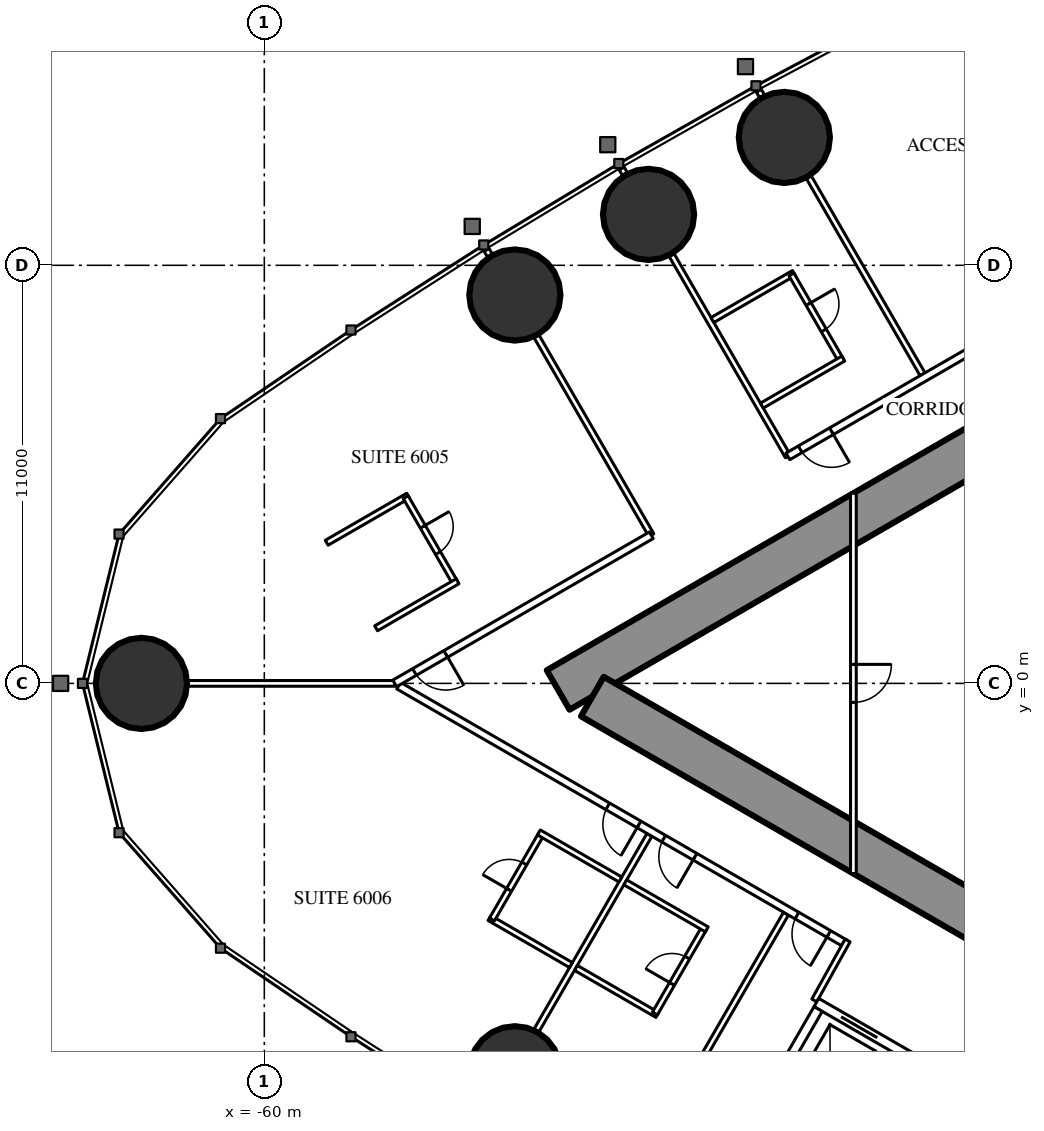
"""IFC4 building model, lengths in metres.
Left out: names, types, materials, properties, quantities, classifications, styles, units other than length and angle.
Written with IfcOpenShell. Run it as: python <this file> out.ifc"""

import sys

from ifc_helpers import new_model, si_unit, direction, frame, frame_2d, origin, origin_2d, place, context, subcontext, project, spatial, rectangle, circle, extrude, element, fill, save


model = new_model("IFC4")
c1 = context("Model", 3, precision=1e-05, world=origin(), true_north=direction((0.0, 1.0)))
c2 = subcontext(c1, "Body", "Model", "MODEL_VIEW")
j1 = project(units=[si_unit("LENGTHUNIT", "METRE"), si_unit("PLANEANGLEUNIT", "RADIAN")], contexts=[c1])
p1 = place(None, origin())
s1 = spatial("IfcSite", under=j1, at=p1, CompositionType="ELEMENT")
p2 = place(p1, origin())
s2 = spatial("IfcBuilding", under=s1, at=p2, CompositionType="ELEMENT")
p3 = place(p2, frame((0.0, 0.0, 226.1)))
s3 = spatial("IfcBuildingStorey", under=s2, at=p3, CompositionType="ELEMENT", Elevation=226.1)
for number, where, z_axis, x_axis in (
    (1, (-63.234, 0.0, 0.0), (0.0, 0.0, 1.0), (1.0, 0.0, 0.0)),
    (2, (-53.408, -10.219, 0.0), (0.0, 0.0, 1.0), (1.0, 0.0, 0.0)),
    (3, (-46.317, 14.365, 0.0), (0.0, 0.0, 1.0), (1.0, 0.0, 0.0)),
    (4, (-49.89, 12.34, 0.0), (0.0, 0.0, 1.0), (1.0, 0.0, 0.0)),
    (5, (-53.408, 10.219, 0.0), (0.0, 0.0, 1.0), (1.0, 0.0, 0.0)),
):
    element("IfcColumn", number, at=place(p3, frame(where, z_axis=z_axis, x_axis=x_axis)), inside=s3, PredefinedType="COLUMN", context=c2, shape_type="SweptSolid", body=[
        extrude(circle(Radius=1.2, at=origin_2d()), origin(), (0.0, 0.0, 1.0), 3.6),
    ])
p4 = place(p3, frame((-27.2, 14.3, 0.0), z_axis=(0.0, 0.0, 1.0), x_axis=(-0.866026593062, -0.499997940104, 0.0)))
e6 = element("IfcWall", 6, at=p4, inside=s3, PredefinedType="SHEAR", context=c2, shape_type="SweptSolid", body=[
    extrude(rectangle(XDim=28.946, YDim=1.2, at=frame_2d((14.473, 0.0))), origin(), (0.0, 0.0, 1.0), 3.6),
])
p5 = place(p4, frame((4.6, 0.0, 0.0)))
e7 = element("IfcOpeningElement", 7, at=p5, cuts=e6, PredefinedType="OPENING", context=c2, shape_type="SweptSolid", body=[
    extrude(rectangle(XDim=1.0, YDim=2.2, at=frame_2d((0.5, 1.1))), frame((0.0, 0.61, 0.0), z_axis=(0.0, -1.0, 0.0), x_axis=(1.0, 0.0, 0.0)), (0.0, 0.0, 1.0), 1.22),
])
p6 = place(p4, frame((13.395, 0.0, 0.0)))
e8 = element("IfcOpeningElement", 8, at=p6, cuts=e6, PredefinedType="OPENING", context=c2, shape_type="SweptSolid", body=[
    extrude(rectangle(XDim=1.8, YDim=2.2, at=frame_2d((0.9, 1.1))), frame((0.0, 0.61, 0.0), z_axis=(0.0, -1.0, 0.0), x_axis=(1.0, 0.0, 0.0)), (0.0, 0.0, 1.0), 1.22),
])
p7 = place(p3, frame((-27.2, -14.3, 0.0), z_axis=(0.0, 0.0, 1.0), x_axis=(-0.866024021859, 0.500002393557, 0.0)))
e9 = element("IfcWall", 9, at=p7, inside=s3, PredefinedType="SHEAR", context=c2, shape_type="SweptSolid", body=[
    extrude(rectangle(XDim=27.907, YDim=1.2, at=frame_2d((13.954, 0.0))), origin(), (0.0, 0.0, 1.0), 3.6),
])
p8 = place(p7, frame((4.6, 0.0, 0.0)))
e10 = element("IfcOpeningElement", 10, at=p8, cuts=e9, PredefinedType="OPENING", context=c2, shape_type="SweptSolid", body=[
    extrude(rectangle(XDim=1.0, YDim=2.2, at=frame_2d((0.5, 1.1))), frame((0.0, 0.61, 0.0), z_axis=(0.0, -1.0, 0.0), x_axis=(1.0, 0.0, 0.0)), (0.0, 0.0, 1.0), 1.22),
])
p9 = place(p7, frame((13.395, 0.0, 0.0)))
e11 = element("IfcOpeningElement", 11, at=p9, cuts=e9, PredefinedType="OPENING", context=c2, shape_type="SweptSolid", body=[
    extrude(rectangle(XDim=1.8, YDim=2.2, at=frame_2d((0.9, 1.1))), frame((0.0, 0.61, 0.0), z_axis=(0.0, -1.0, 0.0), x_axis=(1.0, 0.0, 0.0)), (0.0, 0.0, 1.0), 1.22),
])
p10 = place(p3, frame((-42.68, 8.134, 0.0), z_axis=(0.0, 0.0, 1.0), x_axis=(-0.499984479505, 0.866034364361, 0.0)))
e12 = element("IfcWall", 12, at=p10, inside=s3, PredefinedType="PARTITIONING", context=c2, shape_type="SweptSolid", body=[
    extrude(rectangle(XDim=5.995, YDim=0.15, at=frame_2d((2.998, 0.0))), origin(), (0.0, 0.0, 1.0), 2.45),
])
p11 = place(p3, frame((-46.898, 15.439, 0.0), z_axis=(0.0, 0.0, 1.0), x_axis=(-0.500232303069, 0.865891241997, 0.0)))
e13 = element("IfcWall", 13, at=p11, inside=s3, PredefinedType="PARTITIONING", context=c2, shape_type="SweptSolid", body=[
    extrude(rectangle(XDim=0.18, YDim=0.15, at=frame_2d((0.09, 0.0))), origin(), (0.0, 0.0, 1.0), 2.45),
])
p12 = place(p3, frame((-46.224, 5.972, 0.0), z_axis=(0.0, 0.0, 1.0), x_axis=(-0.500021351822, 0.866013075953, 0.0)))
e14 = element("IfcWall", 14, at=p12, inside=s3, PredefinedType="PARTITIONING", context=c2, shape_type="SweptSolid", body=[
    extrude(rectangle(XDim=6.128, YDim=0.15, at=frame_2d((3.064, 0.0))), origin(), (0.0, 0.0, 1.0), 2.45),
])
p13 = place(p3, frame((-50.508, 13.392, 0.0), z_axis=(0.0, 0.0, 1.0), x_axis=(-0.499644091975, 0.866230789891, 0.0)))
e15 = element("IfcWall", 15, at=p13, inside=s3, PredefinedType="PARTITIONING", context=c2, shape_type="SweptSolid", body=[
    extrude(rectangle(XDim=0.18, YDim=0.15, at=frame_2d((0.09, 0.0))), origin(), (0.0, 0.0, 1.0), 2.45),
])
p14 = place(p3, frame((-49.816, 3.898, 0.0), z_axis=(0.0, 0.0, 1.0), x_axis=(-0.500001913541, 0.866024298998, 0.0)))
e16 = element("IfcWall", 16, at=p14, inside=s3, PredefinedType="PARTITIONING", context=c2, shape_type="SweptSolid", body=[
    extrude(rectangle(XDim=6.05, YDim=0.15, at=frame_2d((3.025, 0.0))), origin(), (0.0, 0.0, 1.0), 2.45),
])
p15 = place(p3, frame((-54.061, 11.25, 0.0), z_axis=(0.0, 0.0, 1.0), x_axis=(-0.500391173478, 0.865799441849, 0.0)))
e17 = element("IfcWall", 17, at=p15, inside=s3, PredefinedType="PARTITIONING", context=c2, shape_type="SweptSolid", body=[
    extrude(rectangle(XDim=0.179, YDim=0.15, at=frame_2d((0.089, 0.0))), origin(), (0.0, 0.0, 1.0), 2.45),
])
p16 = place(p3, frame((-46.274, -6.059, 0.0), z_axis=(0.0, 0.0, 1.0), x_axis=(-0.500020471368, -0.866013584312, 0.0)))
e18 = element("IfcWall", 18, at=p16, inside=s3, PredefinedType="PARTITIONING", context=c2, shape_type="SweptSolid", body=[
    extrude(rectangle(XDim=6.028, YDim=0.15, at=frame_2d((3.014, 0.0))), origin(), (0.0, 0.0, 1.0), 2.45),
])
p17 = place(p3, frame((-49.866, -3.985, 0.0), z_axis=(0.0, 0.0, 1.0), x_axis=(-0.500000694566, -0.866025002776, 0.0)))
e19 = element("IfcWall", 19, at=p17, inside=s3, PredefinedType="PARTITIONING", context=c2, shape_type="SweptSolid", body=[
    extrude(rectangle(XDim=5.95, YDim=0.15, at=frame_2d((2.975, 0.0))), origin(), (0.0, 0.0, 1.0), 2.45),
])
p18 = place(p3, frame((-56.568, 0.0, 0.0), z_axis=(0.0, 0.0, 1.0), x_axis=(-1.0, 0.0, 0.0)))
e20 = element("IfcWall", 20, at=p18, inside=s3, PredefinedType="PARTITIONING", context=c2, shape_type="SweptSolid", body=[
    extrude(rectangle(XDim=5.446, YDim=0.15, at=frame_2d((2.723, 0.0))), origin(), (0.0, 0.0, 1.0), 2.45),
])
p19 = place(p3, frame((-44.715, -6.844, 0.0), z_axis=(0.0, 0.0, 1.0), x_axis=(-0.866025261224, 0.500000246922, 0.0)))
e21 = element("IfcWall", 21, at=p19, inside=s3, PredefinedType="PARTITIONING", context=c2, shape_type="SweptSolid", body=[
    extrude(rectangle(XDim=13.567, YDim=0.2, at=frame_2d((6.783, 0.0))), origin(), (0.0, 0.0, 1.0), 3.35),
])
p20 = place(p19, frame((6.266, 0.0, 0.0)))
e22 = element("IfcOpeningElement", 22, at=p20, cuts=e21, PredefinedType="OPENING", context=c2, shape_type="SweptSolid", body=[
    extrude(rectangle(XDim=0.95, YDim=2.2, at=frame_2d((0.475, 1.1))), frame((0.0, 0.11, 0.0), z_axis=(0.0, -1.0, 0.0), x_axis=(1.0, 0.0, 0.0)), (0.0, 0.0, 1.0), 0.22),
])
p21 = place(p19, frame((4.565, 0.0, 0.0)))
e23 = element("IfcOpeningElement", 23, at=p21, cuts=e21, PredefinedType="OPENING", context=c2, shape_type="SweptSolid", body=[
    extrude(rectangle(XDim=0.95, YDim=2.2, at=frame_2d((0.475, 1.1))), frame((0.0, 0.11, 0.0), z_axis=(0.0, -1.0, 0.0), x_axis=(1.0, 0.0, 0.0)), (0.0, 0.0, 1.0), 0.22),
])
p22 = place(p19, frame((0.5, 0.0, 0.0)))
e24 = element("IfcOpeningElement", 24, at=p22, cuts=e21, PredefinedType="OPENING", context=c2, shape_type="SweptSolid", body=[
    extrude(rectangle(XDim=0.967, YDim=2.2, at=frame_2d((0.483, 1.1))), frame((0.0, 0.11, 0.0), z_axis=(0.0, -1.0, 0.0), x_axis=(1.0, 0.0, 0.0)), (0.0, 0.0, 1.0), 0.22),
])
p23 = place(p3, frame((-44.652, -6.764, 0.0), z_axis=(0.0, 0.0, 1.0), x_axis=(-0.485424724123, -0.874278466629, 0.0)))
e25 = element("IfcWall", 25, at=p23, inside=s3, PredefinedType="PARTITIONING", context=c2, shape_type="SweptSolid", body=[
    extrude(rectangle(XDim=1.805, YDim=0.15, at=frame_2d((0.903, 0.0))), origin(), (0.0, 0.0, 1.0), 3.35),
])
p24 = place(p3, frame((-46.065, 10.798, 0.0), z_axis=(0.0, 0.0, 1.0), x_axis=(-0.866031185235, -0.4999899861, 0.0)))
e26 = element("IfcWall", 26, at=p24, inside=s3, PredefinedType="PARTITIONING", context=c2, shape_type="SweptSolid", body=[
    extrude(rectangle(XDim=2.475, YDim=0.15, at=frame_2d((1.238, 0.0))), origin(), (0.0, 0.0, 1.0), 3.35),
])
p25 = place(p3, frame((-44.83, 8.509, 0.0), z_axis=(0.0, 0.0, 1.0), x_axis=(-0.499936506574, 0.866062058628, 0.0)))
e27 = element("IfcWall", 27, at=p25, inside=s3, PredefinedType="PARTITIONING", context=c2, shape_type="SweptSolid", body=[
    extrude(rectangle(XDim=2.6, YDim=0.15, at=frame_2d((1.3, 0.0))), origin(), (0.0, 0.0, 1.0), 3.35),
])
p26 = place(p25, frame((0.9, 0.0, 0.0)))
e28 = element("IfcOpeningElement", 28, at=p26, cuts=e27, PredefinedType="OPENING", context=c2, shape_type="SweptSolid", body=[
    extrude(rectangle(XDim=0.8, YDim=2.2, at=frame_2d((0.4, 1.1))), frame((0.0, 0.085, 0.0), z_axis=(0.0, -1.0, 0.0), x_axis=(1.0, 0.0, 0.0)), (0.0, 0.0, 1.0), 0.17),
])
for number, where, z_axis, x_axis in (
    (29, (-44.765, 8.546, 0.0), (0.0, 0.0, 1.0), (-0.866, -0.5, 0.0)),
    (30, (-56.215, 4.938, 0.0), (0.0, 0.0, 1.0), (-0.866, -0.5, 0.0)),
):
    element("IfcWall", number, at=place(p3, frame(where, z_axis=z_axis, x_axis=x_axis)), inside=s3, PredefinedType="PARTITIONING", context=c2, shape_type="SweptSolid", body=[
        extrude(rectangle(XDim=2.475, YDim=0.15, at=frame_2d((1.237, 0.0))), origin(), (0.0, 0.0, 1.0), 3.35),
    ])
p27 = place(p3, frame((-54.98, 2.649, 0.0), z_axis=(0.0, 0.0, 1.0), x_axis=(-0.500006934395, 0.866021400173, 0.0)))
e31 = element("IfcWall", 31, at=p27, inside=s3, PredefinedType="PARTITIONING", context=c2, shape_type="SweptSolid", body=[
    extrude(rectangle(XDim=2.6, YDim=0.15, at=frame_2d((1.3, 0.0))), origin(), (0.0, 0.0, 1.0), 3.35),
])
p28 = place(p27, frame((0.9, 0.0, 0.0)))
e32 = element("IfcOpeningElement", 32, at=p28, cuts=e31, PredefinedType="OPENING", context=c2, shape_type="SweptSolid", body=[
    extrude(rectangle(XDim=0.8, YDim=2.2, at=frame_2d((0.4, 1.1))), frame((0.0, 0.085, 0.0), z_axis=(0.0, -1.0, 0.0), x_axis=(1.0, 0.0, 0.0)), (0.0, 0.0, 1.0), 0.17),
])
for number, where, z_axis, x_axis in (
    (33, (-54.915, 2.687, 0.0), (0.0, 0.0, 1.0), (-0.866, -0.5, 0.0)),
    (34, (-51.931, -7.411, 0.0), (0.0, 0.0, 1.0), (-0.866, 0.5, 0.0)),
):
    element("IfcWall", number, at=place(p3, frame(where, z_axis=z_axis, x_axis=x_axis)), inside=s3, PredefinedType="PARTITIONING", context=c2, shape_type="SweptSolid", body=[
        extrude(rectangle(XDim=2.475, YDim=0.15, at=frame_2d((1.237, 0.0))), origin(), (0.0, 0.0, 1.0), 3.35),
    ])
p29 = place(p3, frame((-52.71, -3.96, 0.0), z_axis=(0.0, 0.0, 1.0), x_axis=(-0.500006934395, -0.866021400173, 0.0)))
e35 = element("IfcWall", 35, at=p29, inside=s3, PredefinedType="PARTITIONING", context=c2, shape_type="SweptSolid", body=[
    extrude(rectangle(XDim=2.6, YDim=0.15, at=frame_2d((1.3, 0.0))), origin(), (0.0, 0.0, 1.0), 3.35),
])
p30 = place(p29, frame((0.9, 0.0, 0.0)))
e36 = element("IfcOpeningElement", 36, at=p30, cuts=e35, PredefinedType="OPENING", context=c2, shape_type="SweptSolid", body=[
    extrude(rectangle(XDim=0.8, YDim=2.2, at=frame_2d((0.4, 1.1))), frame((0.0, 0.085, 0.0), z_axis=(0.0, -1.0, 0.0), x_axis=(1.0, 0.0, 0.0)), (0.0, 0.0, 1.0), 0.17),
])
p31 = place(p3, frame((-50.631, -5.16, 0.0), z_axis=(0.0, 0.0, 1.0), x_axis=(-0.86604923931, 0.499958713387, 0.0)))
e37 = element("IfcWall", 37, at=p31, inside=s3, PredefinedType="PARTITIONING", context=c2, shape_type="SweptSolid", body=[
    extrude(rectangle(XDim=2.475, YDim=0.15, at=frame_2d((1.237, 0.0))), origin(), (0.0, 0.0, 1.0), 2.5),
])
p32 = place(p3, frame((-49.658, -8.724, 0.0), z_axis=(0.0, 0.0, 1.0), x_axis=(-0.866031185235, 0.4999899861, 0.0)))
e38 = element("IfcWall", 38, at=p32, inside=s3, PredefinedType="PARTITIONING", context=c2, shape_type="SweptSolid", body=[
    extrude(rectangle(XDim=2.475, YDim=0.15, at=frame_2d((1.238, 0.0))), origin(), (0.0, 0.0, 1.0), 3.35),
])
p33 = place(p3, frame((-48.423, -6.435, 0.0), z_axis=(0.0, 0.0, 1.0), x_axis=(-0.500006934395, -0.866021400173, 0.0)))
e39 = element("IfcWall", 39, at=p33, inside=s3, PredefinedType="PARTITIONING", context=c2, shape_type="SweptSolid", body=[
    extrude(rectangle(XDim=2.6, YDim=0.15, at=frame_2d((1.3, 0.0))), origin(), (0.0, 0.0, 1.0), 3.35),
])
p34 = place(p33, frame((0.9, 0.0, 0.0)))
e40 = element("IfcOpeningElement", 40, at=p34, cuts=e39, PredefinedType="OPENING", context=c2, shape_type="SweptSolid", body=[
    extrude(rectangle(XDim=0.8, YDim=2.2, at=frame_2d((0.4, 1.1))), frame((0.0, 0.085, 0.0), z_axis=(0.0, -1.0, 0.0), x_axis=(1.0, 0.0, 0.0)), (0.0, 0.0, 1.0), 0.17),
])
p35 = place(p3, frame((-48.358, -6.472, 0.0), z_axis=(0.0, 0.0, 1.0), x_axis=(-0.866073894602, 0.499916002032, 0.0)))
e41 = element("IfcWall", 41, at=p35, inside=s3, PredefinedType="PARTITIONING", context=c2, shape_type="SweptSolid", body=[
    extrude(rectangle(XDim=2.475, YDim=0.15, at=frame_2d((1.238, 0.0))), origin(), (0.0, 0.0, 1.0), 2.5),
])
p36 = place(p3, frame((-28.737, 16.068, 0.0), z_axis=(0.0, 0.0, 1.0), x_axis=(-0.866023901326, -0.500002602325, 0.0)))
e42 = element("IfcWall", 42, at=p36, inside=s3, PredefinedType="PARTITIONING", context=c2, shape_type="SweptSolid", body=[
    extrude(rectangle(XDim=20.192, YDim=0.2, at=frame_2d((10.096, 0.0))), origin(), (0.0, 0.0, 1.0), 3.35),
])
p37 = place(p36, frame((1.08, 0.0, 0.0)))
e43 = element("IfcOpeningElement", 43, at=p37, cuts=e42, PredefinedType="OPENING", context=c2, shape_type="SweptSolid", body=[
    extrude(rectangle(XDim=1.8, YDim=2.04, at=frame_2d((0.9, 1.02))), frame((0.0, 0.11, 0.0), z_axis=(0.0, -1.0, 0.0), x_axis=(1.0, 0.0, 0.0)), (0.0, 0.0, 1.0), 0.22),
])
p38 = place(p36, frame((6.86, 0.0, 0.0)))
e44 = element("IfcOpeningElement", 44, at=p38, cuts=e42, PredefinedType="OPENING", context=c2, shape_type="SweptSolid", body=[
    extrude(rectangle(XDim=1.0, YDim=2.2, at=frame_2d((0.5, 1.1))), frame((0.0, 0.11, 0.0), z_axis=(0.0, -1.0, 0.0), x_axis=(1.0, 0.0, 0.0)), (0.0, 0.0, 1.0), 0.22),
])
p39 = place(p36, frame((18.867, 0.0, 0.0)))
e45 = element("IfcOpeningElement", 45, at=p39, cuts=e42, PredefinedType="OPENING", context=c2, shape_type="SweptSolid", body=[
    extrude(rectangle(XDim=0.95, YDim=2.2, at=frame_2d((0.475, 1.1))), frame((0.0, 0.11, 0.0), z_axis=(0.0, -1.0, 0.0), x_axis=(1.0, 0.0, 0.0)), (0.0, 0.0, 1.0), 0.22),
])
p40 = place(p3, frame((-49.816, 3.898, 0.0), z_axis=(0.0, 0.0, 1.0), x_axis=(-0.866028102716, -0.499995325284, 0.0)))
e46 = element("IfcWall", 46, at=p40, inside=s3, PredefinedType="PARTITIONING", context=c2, shape_type="SweptSolid", body=[
    extrude(rectangle(XDim=7.796, YDim=0.2, at=frame_2d((3.898, 0.0))), origin(), (0.0, 0.0, 1.0), 3.35),
])
p41 = place(p40, frame((6.246, 0.0, 0.0)))
e47 = element("IfcOpeningElement", 47, at=p41, cuts=e46, PredefinedType="OPENING", context=c2, shape_type="SweptSolid", body=[
    extrude(rectangle(XDim=0.95, YDim=2.2, at=frame_2d((0.475, 1.1))), frame((0.0, 0.11, 0.0), z_axis=(0.0, -1.0, 0.0), x_axis=(1.0, 0.0, 0.0)), (0.0, 0.0, 1.0), 0.22),
])
p42 = place(p3, frame((-44.5, 5.005, 0.0), z_axis=(0.0, 0.0, 1.0), x_axis=(0.0, -1.0, 0.0)))
e48 = element("IfcWall", 48, at=p42, inside=s3, PredefinedType="PARTITIONING", context=c2, shape_type="SweptSolid", body=[
    extrude(rectangle(XDim=10.009, YDim=0.15, at=frame_2d((5.005, 0.0))), origin(), (0.0, 0.0, 1.0), 2.5),
])
p43 = place(p42, frame((4.505, 0.0, 0.0)))
e49 = element("IfcOpeningElement", 49, at=p43, cuts=e48, PredefinedType="OPENING", context=c2, shape_type="SweptSolid", body=[
    extrude(rectangle(XDim=1.0, YDim=2.2, at=frame_2d((0.5, 1.1))), frame((0.0, 0.085, 0.0), z_axis=(0.0, -1.0, 0.0), x_axis=(1.0, 0.0, 0.0)), (0.0, 0.0, 1.0), 0.17),
])
p44 = place(p3, frame((-39.758, -11.697, 0.0), z_axis=(0.0, 0.0, 1.0), x_axis=(-0.866024194504, 0.500002094529, 0.0)))
e50 = element("IfcWall", 50, at=p44, inside=s3, PredefinedType="PARTITIONING", context=c2, shape_type="SweptSolid", body=[
    extrude(rectangle(XDim=6.6, YDim=0.25, at=frame_2d((3.3, 0.0))), origin(), (0.0, 0.0, 1.0), 3.35),
])
p45 = place(p44, frame((0.75, 0.0, 0.0)))
e51 = element("IfcOpeningElement", 51, at=p45, cuts=e50, PredefinedType="OPENING", context=c2, shape_type="SweptSolid", body=[
    extrude(rectangle(XDim=1.1, YDim=2.2, at=frame_2d((0.55, 1.1))), frame((0.0, 0.135, 0.0), z_axis=(0.0, -1.0, 0.0), x_axis=(1.0, 0.0, 0.0)), (0.0, 0.0, 1.0), 0.27),
])
p46 = place(p44, frame((2.75, 0.0, 0.0)))
e52 = element("IfcOpeningElement", 52, at=p46, cuts=e50, PredefinedType="OPENING", context=c2, shape_type="SweptSolid", body=[
    extrude(rectangle(XDim=1.1, YDim=2.2, at=frame_2d((0.55, 1.1))), frame((0.0, 0.135, 0.0), z_axis=(0.0, -1.0, 0.0), x_axis=(1.0, 0.0, 0.0)), (0.0, 0.0, 1.0), 0.27),
])
p47 = place(p44, frame((4.75, 0.0, 0.0)))
e53 = element("IfcOpeningElement", 53, at=p47, cuts=e50, PredefinedType="OPENING", context=c2, shape_type="SweptSolid", body=[
    extrude(rectangle(XDim=1.1, YDim=2.2, at=frame_2d((0.55, 1.1))), frame((0.0, 0.135, 0.0), z_axis=(0.0, -1.0, 0.0), x_axis=(1.0, 0.0, 0.0)), (0.0, 0.0, 1.0), 0.27),
])
p48 = place(p3, frame((-45.428, -8.568, 0.0), z_axis=(0.0, 0.0, 1.0), x_axis=(-0.499929347863, -0.866066190972, 0.0)))
e54 = element("IfcWall", 54, at=p48, inside=s3, PredefinedType="PARTITIONING", context=c2, shape_type="SweptSolid", body=[
    extrude(rectangle(XDim=3.201, YDim=0.25, at=frame_2d((1.6, 0.0))), origin(), (0.0, 0.0, 1.0), 3.35),
])
p49 = place(p26, origin())
e55 = element("IfcDoor", 55, at=p49, inside=s3, OperationType="SINGLE_SWING_RIGHT", PredefinedType="DOOR", context=c2, shape_type="SweptSolid", body=[
    extrude(rectangle(XDim=0.8, YDim=2.2, at=frame_2d((0.4, 1.1))), frame((0.0, 0.025, 0.0), z_axis=(0.0, -1.0, 0.0), x_axis=(1.0, 0.0, 0.0)), (0.0, 0.0, 1.0), 0.05),
])
fill(e28, e55)
p50 = place(p39, origin())
e56 = element("IfcDoor", 56, at=p50, inside=s3, OperationType="SINGLE_SWING_LEFT", PredefinedType="DOOR", context=c2, shape_type="SweptSolid", body=[
    extrude(rectangle(XDim=0.95, YDim=2.2, at=frame_2d((0.475, 1.1))), frame((0.0, 0.025, 0.0), z_axis=(0.0, -1.0, 0.0), x_axis=(1.0, 0.0, 0.0)), (0.0, 0.0, 1.0), 0.05),
])
fill(e45, e56)
p51 = place(p28, origin())
e57 = element("IfcDoor", 57, at=p51, inside=s3, OperationType="SINGLE_SWING_RIGHT", PredefinedType="DOOR", context=c2, shape_type="SweptSolid", body=[
    extrude(rectangle(XDim=0.8, YDim=2.2, at=frame_2d((0.4, 1.1))), frame((0.0, 0.025, 0.0), z_axis=(0.0, -1.0, 0.0), x_axis=(1.0, 0.0, 0.0)), (0.0, 0.0, 1.0), 0.05),
])
fill(e32, e57)
p52 = place(p41, origin())
e58 = element("IfcDoor", 58, at=p52, inside=s3, OperationType="SINGLE_SWING_LEFT", PredefinedType="DOOR", context=c2, shape_type="SweptSolid", body=[
    extrude(rectangle(XDim=0.95, YDim=2.2, at=frame_2d((0.475, 1.1))), frame((0.0, 0.025, 0.0), z_axis=(0.0, -1.0, 0.0), x_axis=(1.0, 0.0, 0.0)), (0.0, 0.0, 1.0), 0.05),
])
fill(e47, e58)
p53 = place(p30, origin())
e59 = element("IfcDoor", 59, at=p53, inside=s3, OperationType="SINGLE_SWING_RIGHT", PredefinedType="DOOR", context=c2, shape_type="SweptSolid", body=[
    extrude(rectangle(XDim=0.8, YDim=2.2, at=frame_2d((0.4, 1.1))), frame((0.0, 0.025, 0.0), z_axis=(0.0, -1.0, 0.0), x_axis=(1.0, 0.0, 0.0)), (0.0, 0.0, 1.0), 0.05),
])
fill(e36, e59)
p54 = place(p20, origin())
e60 = element("IfcDoor", 60, at=p54, inside=s3, OperationType="SINGLE_SWING_LEFT", PredefinedType="DOOR", context=c2, shape_type="SweptSolid", body=[
    extrude(rectangle(XDim=0.95, YDim=2.2, at=frame_2d((0.475, 1.1))), frame((0.0, 0.025, 0.0), z_axis=(0.0, -1.0, 0.0), x_axis=(1.0, 0.0, 0.0)), (0.0, 0.0, 1.0), 0.05),
])
fill(e22, e60)
p55 = place(p34, origin())
e61 = element("IfcDoor", 61, at=p55, inside=s3, OperationType="SINGLE_SWING_RIGHT", PredefinedType="DOOR", context=c2, shape_type="SweptSolid", body=[
    extrude(rectangle(XDim=0.8, YDim=2.2, at=frame_2d((0.4, 1.1))), frame((0.0, 0.025, 0.0), z_axis=(0.0, -1.0, 0.0), x_axis=(1.0, 0.0, 0.0)), (0.0, 0.0, 1.0), 0.05),
])
fill(e40, e61)
p56 = place(p21, origin())
e62 = element("IfcDoor", 62, at=p56, inside=s3, OperationType="SINGLE_SWING_LEFT", PredefinedType="DOOR", context=c2, shape_type="SweptSolid", body=[
    extrude(rectangle(XDim=0.95, YDim=2.2, at=frame_2d((0.475, 1.1))), frame((0.0, 0.025, 0.0), z_axis=(0.0, -1.0, 0.0), x_axis=(1.0, 0.0, 0.0)), (0.0, 0.0, 1.0), 0.05),
])
fill(e23, e62)
p57 = place(p22, origin())
e63 = element("IfcDoor", 63, at=p57, inside=s3, OperationType="SINGLE_SWING_LEFT", PredefinedType="DOOR", context=c2, shape_type="SweptSolid", body=[
    extrude(rectangle(XDim=0.967, YDim=2.2, at=frame_2d((0.483, 1.1))), frame((0.0, 0.025, 0.0), z_axis=(0.0, -1.0, 0.0), x_axis=(1.0, 0.0, 0.0)), (0.0, 0.0, 1.0), 0.05),
])
fill(e24, e63)
p58 = place(p43, origin())
e64 = element("IfcDoor", 64, at=p58, inside=s3, OperationType="SINGLE_SWING_LEFT", PredefinedType="DOOR", context=c2, shape_type="SweptSolid", body=[
    extrude(rectangle(XDim=1.0, YDim=2.2, at=frame_2d((0.5, 1.1))), frame((0.0, 0.025, 0.0), z_axis=(0.0, -1.0, 0.0), x_axis=(1.0, 0.0, 0.0)), (0.0, 0.0, 1.0), 0.05),
])
fill(e49, e64)
p59 = place(p47, origin())
e65 = element("IfcDoor", 65, at=p59, inside=s3, OperationType="DOUBLE_DOOR_SLIDING", PredefinedType="USERDEFINED", context=c2, shape_type="SweptSolid", body=[
    extrude(rectangle(XDim=1.1, YDim=2.2, at=frame_2d((0.55, 1.1))), frame((0.0, 0.025, 0.0), z_axis=(0.0, -1.0, 0.0), x_axis=(1.0, 0.0, 0.0)), (0.0, 0.0, 1.0), 0.05),
])
fill(e53, e65)
save(model, sys.argv[1])
